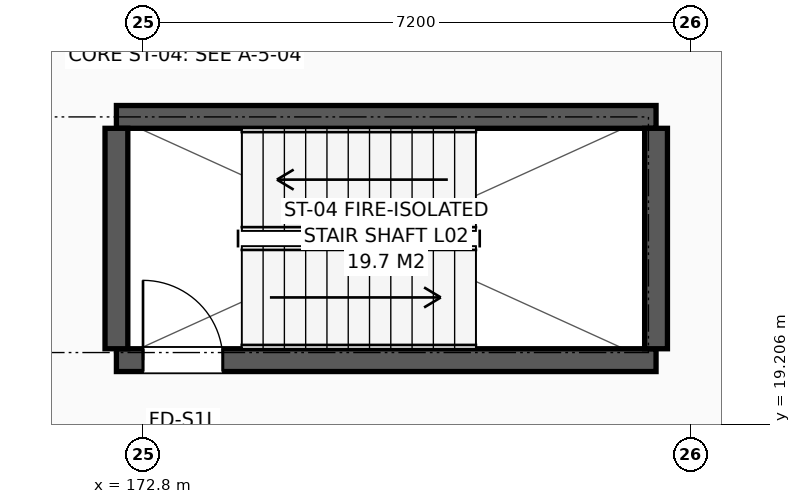
"""IFC4 building model, lengths in metres.
Left out: names, types, materials, properties, quantities, classifications, styles, units other than length and angle.
Written with IfcOpenShell. Run it as: python <this file> out.ifc"""

import sys

from ifc_helpers import new_model, si_unit, direction, frame, frame_2d, origin, place, context, subcontext, project, spatial, rectangle, extrude, element, fill, save


model = new_model("IFC4")
c1 = context("Model", 3, precision=1e-05, world=origin(), true_north=direction((0.0, 1.0)))
c2 = subcontext(c1, "Body", "Model", "MODEL_VIEW")
j1 = project(units=[si_unit("LENGTHUNIT", "METRE"), si_unit("PLANEANGLEUNIT", "RADIAN")], contexts=[c1])
p1 = place(None, origin())
s1 = spatial("IfcSite", under=j1, at=p1, CompositionType="ELEMENT")
p2 = place(p1, origin())
s2 = spatial("IfcBuilding", under=s1, at=p2, CompositionType="ELEMENT")
p3 = place(p2, frame((0.0, 0.0, 9.0)))
s3 = spatial("IfcBuildingStorey", under=s2, at=p3, CompositionType="ELEMENT", Elevation=9.0)
p4 = place(p3, frame((172.45, 20.05, 0.0), z_axis=(0.0, 0.0, 1.0), x_axis=(1.0, 0.0, 0.0)))
e1 = element("IfcWall", 1, at=p4, inside=s3, PredefinedType="SHEAR", context=c2, shape_type="SweptSolid", body=[
    extrude(rectangle(XDim=7.1, YDim=0.3, at=frame_2d((3.55, 0.0))), origin(), (0.0, 0.0, 1.0), 3.875),
])
p5 = place(p4, frame((0.35, 0.0, 0.0)))
e2 = element("IfcOpeningElement", 2, at=p5, cuts=e1, PredefinedType="OPENING", context=c2, shape_type="SweptSolid", body=[
    extrude(rectangle(XDim=1.05, YDim=2.15, at=frame_2d((0.525, 1.075))), frame((0.0, 0.16, 0.0), z_axis=(0.0, -1.0, 0.0), x_axis=(1.0, 0.0, 0.0)), (0.0, 0.0, 1.0), 0.32),
])
p6 = place(p3, frame((179.55, 23.25, 0.0), z_axis=(0.0, 0.0, 1.0), x_axis=(-1.0, 0.0, 0.0)))
e3 = element("IfcWall", 3, at=p6, inside=s3, PredefinedType="SHEAR", context=c2, shape_type="SweptSolid", body=[
    extrude(rectangle(XDim=7.1, YDim=0.3, at=frame_2d((3.55, 0.0))), origin(), (0.0, 0.0, 1.0), 3.875),
])
for number, where, z_axis, x_axis in (
    (4, (179.55, 20.2, 0.0), (0.0, 0.0, 1.0), (0.0, 1.0, 0.0)),
    (5, (172.45, 23.1, 0.0), (0.0, 0.0, 1.0), (0.0, -1.0, 0.0)),
):
    element("IfcWall", number, at=place(p3, frame(where, z_axis=z_axis, x_axis=x_axis)), inside=s3, PredefinedType="SHEAR", context=c2, shape_type="SweptSolid", body=[
        extrude(rectangle(XDim=2.9, YDim=0.3, at=frame_2d((1.45, 0.0))), origin(), (0.0, 0.0, 1.0), 3.875),
    ])
p7 = place(p5, origin())
e6 = element("IfcDoor", 6, at=p7, inside=s3, OperationType="SINGLE_SWING_LEFT", PredefinedType="DOOR", context=c2, shape_type="SweptSolid", body=[
    extrude(rectangle(XDim=1.05, YDim=2.15, at=frame_2d((0.525, 1.075))), frame((0.0, 0.025, 0.0), z_axis=(0.0, -1.0, 0.0), x_axis=(1.0, 0.0, 0.0)), (0.0, 0.0, 1.0), 0.05),
])
fill(e2, e6)
save(model, sys.argv[1])
